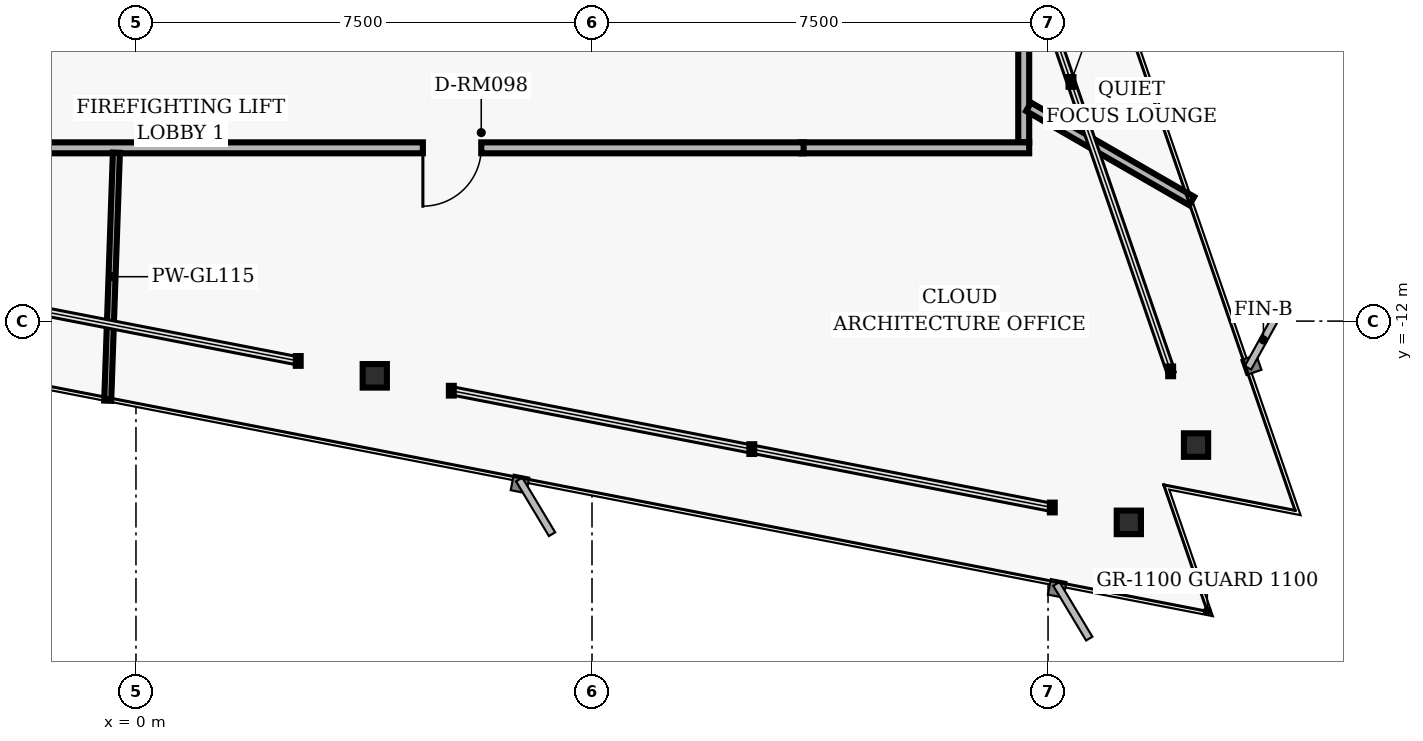
"""IFC4 building model, lengths in metres.
Left out: names, types, materials, properties, quantities, classifications, styles, units other than length and angle.
Written with IfcOpenShell. Run it as: python <this file> out.ifc"""

import sys

from ifc_helpers import new_model, si_unit, direction, frame, frame_2d, origin, origin_2d, place, context, subcontext, project, spatial, rectangle, i_section, extrude, element, fill, save


model = new_model("IFC4")
c1 = context("Model", 3, precision=1e-05, world=origin(), true_north=direction((0.0, 1.0)))
c2 = subcontext(c1, "Body", "Model", "MODEL_VIEW")
j1 = project(units=[si_unit("LENGTHUNIT", "METRE"), si_unit("PLANEANGLEUNIT", "RADIAN")], contexts=[c1])
p1 = place(None, origin())
s1 = spatial("IfcSite", under=j1, at=p1, CompositionType="ELEMENT")
p2 = place(p1, origin())
s2 = spatial("IfcBuilding", under=s1, at=p2, CompositionType="ELEMENT")
p3 = place(p2, frame((0.0, 0.0, 165.44)))
s3 = spatial("IfcBuildingStorey", under=s2, at=p3, CompositionType="ELEMENT", Elevation=165.44)
for number, where, z_axis, x_axis in (
    (1, (17.434, -14.039, 0.0), (0.0, 0.0, 1.0), (1.0, 0.0, 0.0)),
    (2, (3.927, -12.9, 0.0), (0.0, 0.0, 1.0), (1.0, 0.0, 0.0)),
    (3, (16.329, -15.311, 0.0), (0.0, 0.0, 1.0), (1.0, 0.0, 0.0)),
):
    element("IfcColumn", number, at=place(p3, frame(where, z_axis=z_axis, x_axis=x_axis)), inside=s3, PredefinedType="COLUMN", context=c2, shape_type="SweptSolid", body=[
        extrude(i_section(OverallWidth=0.398, OverallDepth=0.387, WebThickness=0.021, FlangeThickness=0.033, FilletRadius=0.018, at=origin_2d()), origin(), (0.0, 0.0, 1.0), 3.04),
    ])
p4 = place(p3, frame((14.6, -7.18, 0.0), z_axis=(0.0, 0.0, 1.0), x_axis=(0.0, -1.0, 0.0)))
e4 = element("IfcWall", 4, at=p4, inside=s3, PredefinedType="PARTITIONING", context=c2, shape_type="SweptSolid", body=[
    extrude(rectangle(XDim=1.88, YDim=0.18, at=frame_2d((0.94, 0.0))), origin(), (0.0, 0.0, 1.0), 2.763),
])
p5 = place(p3, frame((14.69, -9.15, 0.0), z_axis=(0.0, 0.0, 1.0), x_axis=(-1.0, 0.0, 0.0)))
e5 = element("IfcWall", 5, at=p5, inside=s3, PredefinedType="PARTITIONING", context=c2, shape_type="SweptSolid", body=[
    extrude(rectangle(XDim=3.75, YDim=0.18, at=frame_2d((1.875, 0.0))), origin(), (0.0, 0.0, 1.0), 2.763),
])
p6 = place(p3, frame((10.98, -9.15, 0.0), z_axis=(0.0, 0.0, 1.0), x_axis=(-1.0, 0.0, 0.0)))
e6 = element("IfcWall", 6, at=p6, inside=s3, PredefinedType="PARTITIONING", context=c2, shape_type="SweptSolid", body=[
    extrude(rectangle(XDim=17.5, YDim=0.18, at=frame_2d((8.75, 0.0))), origin(), (0.0, 0.0, 1.0), 2.33),
])
p7 = place(p6, frame((13.791, 0.0, 0.0)))
e7 = element("IfcOpeningElement", 7, at=p7, cuts=e6, PredefinedType="OPENING", context=c2, shape_type="SweptSolid", body=[
    extrude(rectangle(XDim=0.96, YDim=2.02, at=frame_2d((0.48, 1.01))), frame((0.0, 0.1, 0.0), z_axis=(0.0, -1.0, 0.0), x_axis=(1.0, 0.0, 0.0)), (0.0, 0.0, 1.0), 0.2),
])
p8 = place(p6, frame((5.302, 0.0, 0.0)))
e8 = element("IfcOpeningElement", 8, at=p8, cuts=e6, PredefinedType="OPENING", context=c2, shape_type="SweptSolid", body=[
    extrude(rectangle(XDim=0.96, YDim=2.02, at=frame_2d((0.48, 1.01))), frame((0.0, 0.1, 0.0), z_axis=(0.0, -1.0, 0.0), x_axis=(1.0, 0.0, 0.0)), (0.0, 0.0, 1.0), 0.2),
])
p9 = place(p3, frame((-0.322, -9.23, 0.0), z_axis=(0.0, 0.0, 1.0), x_axis=(-0.034927807623, -0.999389837978, 0.0)))
e9 = element("IfcWall", 9, at=p9, inside=s3, PredefinedType="MOVABLE", context=c2, shape_type="SweptSolid", body=[
    extrude(rectangle(XDim=4.082, YDim=0.115, at=frame_2d((2.041, 0.0))), origin(), (0.0, 0.0, 1.0), 2.763),
])
p10 = place(p3, frame((14.68, -8.476, 0.0), z_axis=(0.0, 0.0, 1.0), x_axis=(0.866047813034, -0.499961184032, 0.0)))
e10 = element("IfcWall", 10, at=p10, inside=s3, PredefinedType="PARTITIONING", context=c2, shape_type="SweptSolid", body=[
    extrude(rectangle(XDim=3.098, YDim=0.16, at=frame_2d((1.549, 0.0))), origin(), (0.0, 0.0, 1.0), 2.763),
])
p11 = place(p8, origin())
e11 = element("IfcDoor", 11, at=p11, inside=s3, OperationType="SINGLE_SWING_RIGHT", PredefinedType="DOOR", context=c2, shape_type="SweptSolid", body=[
    extrude(rectangle(XDim=0.96, YDim=2.02, at=frame_2d((0.48, 1.01))), frame((0.0, 0.025, 0.0), z_axis=(0.0, -1.0, 0.0), x_axis=(1.0, 0.0, 0.0)), (0.0, 0.0, 1.0), 0.05),
])
fill(e8, e11)
save(model, sys.argv[1])
